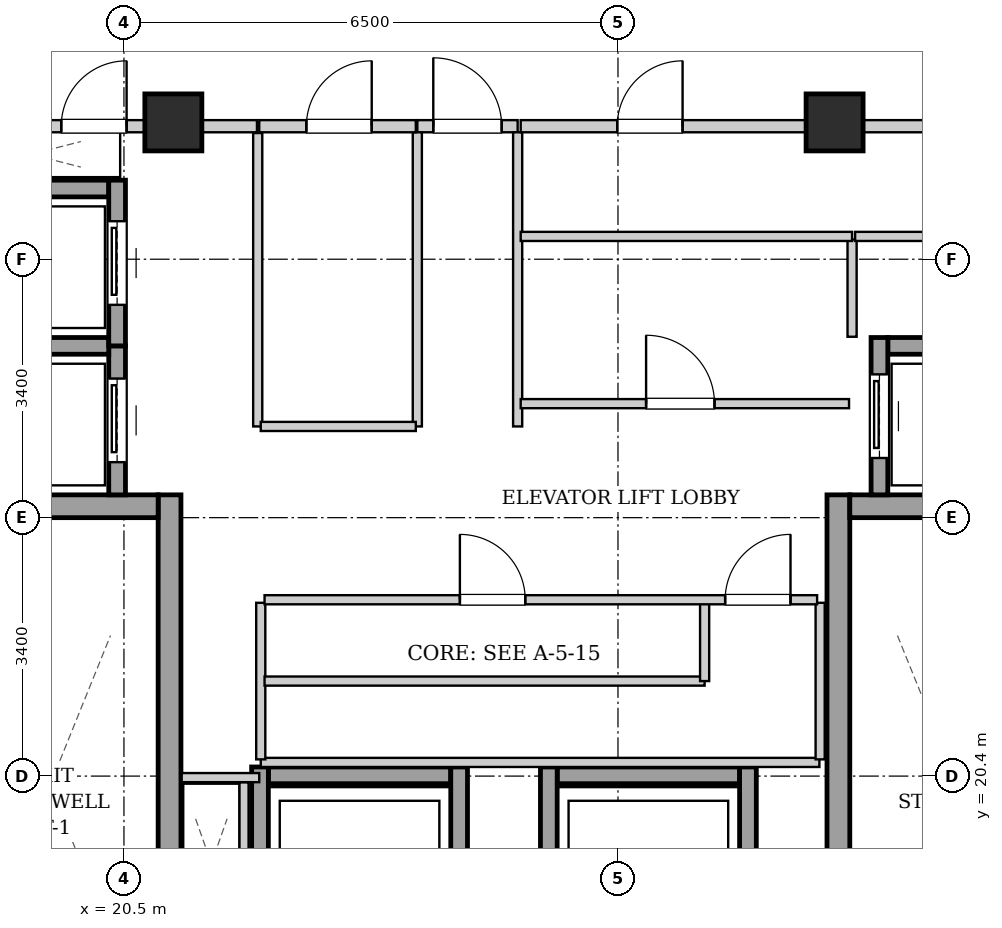
"""IFC4 building model, lengths in metres.
Left out: names, types, materials, properties, quantities, classifications, styles, units other than length and angle.
Written with IfcOpenShell. Run it as: python <this file> out.ifc"""

import sys

from ifc_helpers import new_model, si_unit, direction, frame, frame_2d, origin, origin_2d, place, context, subcontext, project, spatial, rectangle, extrude, element, fill, save


model = new_model("IFC4")
c1 = context("Model", 3, precision=1e-05, world=origin(), true_north=direction((0.0, 1.0)))
c2 = subcontext(c1, "Body", "Model", "MODEL_VIEW")
j1 = project(units=[si_unit("LENGTHUNIT", "METRE"), si_unit("PLANEANGLEUNIT", "RADIAN")], contexts=[c1])
p1 = place(None, origin())
s1 = spatial("IfcSite", under=j1, at=p1, CompositionType="ELEMENT")
p2 = place(p1, origin())
s2 = spatial("IfcBuilding", under=s1, at=p2, CompositionType="ELEMENT")
p3 = place(p2, frame((0.0, 0.0, 217.3)))
s3 = spatial("IfcBuildingStorey", under=s2, at=p3, CompositionType="ELEMENT", Elevation=217.3)
for number, where, z_axis, x_axis in (
    (1, (21.15, 29.0, 0.0), (0.0, 0.0, 1.0), (1.0, 0.0, 0.0)),
    (2, (29.85, 29.0, 0.0), (0.0, 0.0, 1.0), (1.0, 0.0, 0.0)),
):
    element("IfcColumn", number, at=place(p3, frame(where, z_axis=z_axis, x_axis=x_axis)), inside=s3, PredefinedType="COLUMN", context=c2, shape_type="SweptSolid", body=[
        extrude(rectangle(XDim=0.75, YDim=0.75, at=origin_2d()), origin(), (0.0, 0.0, 1.0), 3.4),
    ])
p4 = place(p3, frame((21.1, 15.1, 0.0), z_axis=(0.0, 0.0, 1.0), x_axis=(0.0, 1.0, 0.0)))
e3 = element("IfcWall", 3, at=p4, inside=s3, PredefinedType="SHEAR", context=c2, shape_type="SweptSolid", body=[
    extrude(rectangle(XDim=9.0, YDim=0.3, at=frame_2d((4.5, 0.0))), origin(), (0.0, 0.0, 1.0), 3.14),
])
p5 = place(p3, frame((18.1, 23.95, 0.0), z_axis=(0.0, 0.0, 1.0), x_axis=(1.0, 0.0, 0.0)))
e4 = element("IfcWall", 4, at=p5, inside=s3, PredefinedType="SHEAR", context=c2, shape_type="SweptSolid", body=[
    extrude(rectangle(XDim=2.85, YDim=0.3, at=frame_2d((1.425, 0.0))), origin(), (0.0, 0.0, 1.0), 3.14),
])
p6 = place(p3, frame((29.9, 15.1, 0.0), z_axis=(0.0, 0.0, 1.0), x_axis=(0.0, 1.0, 0.0)))
e5 = element("IfcWall", 5, at=p6, inside=s3, PredefinedType="SHEAR", context=c2, shape_type="SweptSolid", body=[
    extrude(rectangle(XDim=9.0, YDim=0.3, at=frame_2d((4.5, 0.0))), origin(), (0.0, 0.0, 1.0), 3.14),
])
p7 = place(p3, frame((30.05, 23.95, 0.0), z_axis=(0.0, 0.0, 1.0), x_axis=(1.0, 0.0, 0.0)))
e6 = element("IfcWall", 6, at=p7, inside=s3, PredefinedType="SHEAR", context=c2, shape_type="SweptSolid", body=[
    extrude(rectangle(XDim=2.85, YDim=0.3, at=frame_2d((1.425, 0.0))), origin(), (0.0, 0.0, 1.0), 3.14),
])
p8 = place(p3, frame((20.41, 24.1, 0.0), z_axis=(0.0, 0.0, 1.0), x_axis=(0.0, 1.0, 0.0)))
e7 = element("IfcWall", 7, at=p8, inside=s3, PredefinedType="SHEAR", context=c2, shape_type="SweptSolid", body=[
    extrude(rectangle(XDim=1.96, YDim=0.22, at=frame_2d((0.98, 0.0))), origin(), (0.0, 0.0, 1.0), 3.14),
])
p9 = place(p8, frame((0.43, 0.0, 0.0)))
e8 = element("IfcOpeningElement", 8, at=p9, cuts=e7, PredefinedType="OPENING", context=c2, shape_type="SweptSolid", body=[
    extrude(rectangle(XDim=1.1, YDim=2.15, at=frame_2d((0.55, 1.075))), frame((0.0, 0.12, 0.0), z_axis=(0.0, -1.0, 0.0), x_axis=(1.0, 0.0, 0.0)), (0.0, 0.0, 1.0), 0.24),
])
for number, where, z_axis, x_axis in (
    (9, (18.4, 26.06, 0.0), (0.0, 0.0, 1.0), (1.0, 0.0, 0.0)),
    (10, (18.4, 28.13, 0.0), (0.0, 0.0, 1.0), (1.0, 0.0, 0.0)),
):
    element("IfcWall", number, at=place(p3, frame(where, z_axis=z_axis, x_axis=x_axis)), inside=s3, PredefinedType="SHEAR", context=c2, shape_type="SweptSolid", body=[
        extrude(rectangle(XDim=1.9, YDim=0.22, at=frame_2d((0.95, 0.0))), origin(), (0.0, 0.0, 1.0), 3.14),
    ])
p10 = place(p3, frame((20.41, 26.06, 0.0), z_axis=(0.0, 0.0, 1.0), x_axis=(0.0, 1.0, 0.0)))
e11 = element("IfcWall", 11, at=p10, inside=s3, PredefinedType="SHEAR", context=c2, shape_type="SweptSolid", body=[
    extrude(rectangle(XDim=2.18, YDim=0.22, at=frame_2d((1.09, 0.0))), origin(), (0.0, 0.0, 1.0), 3.14),
])
p11 = place(p10, frame((0.54, 0.0, 0.0)))
e12 = element("IfcOpeningElement", 12, at=p11, cuts=e11, PredefinedType="OPENING", context=c2, shape_type="SweptSolid", body=[
    extrude(rectangle(XDim=1.1, YDim=2.15, at=frame_2d((0.55, 1.075))), frame((0.0, 0.12, 0.0), z_axis=(0.0, -1.0, 0.0), x_axis=(1.0, 0.0, 0.0)), (0.0, 0.0, 1.0), 0.24),
])
p12 = place(p3, frame((30.55, 26.06, 0.0), z_axis=(0.0, 0.0, 1.0), x_axis=(1.0, 0.0, 0.0)))
e13 = element("IfcWall", 13, at=p12, inside=s3, PredefinedType="SHEAR", context=c2, shape_type="SweptSolid", body=[
    extrude(rectangle(XDim=1.9, YDim=0.22, at=frame_2d((0.95, 0.0))), origin(), (0.0, 0.0, 1.0), 3.14),
])
p13 = place(p3, frame((30.44, 24.1, 0.0), z_axis=(0.0, 0.0, 1.0), x_axis=(0.0, 1.0, 0.0)))
e14 = element("IfcWall", 14, at=p13, inside=s3, PredefinedType="SHEAR", context=c2, shape_type="SweptSolid", body=[
    extrude(rectangle(XDim=2.07, YDim=0.22, at=frame_2d((1.035, 0.0))), origin(), (0.0, 0.0, 1.0), 3.14),
])
p14 = place(p13, frame((0.485, 0.0, 0.0)))
e15 = element("IfcOpeningElement", 15, at=p14, cuts=e14, PredefinedType="OPENING", context=c2, shape_type="SweptSolid", body=[
    extrude(rectangle(XDim=1.1, YDim=2.15, at=frame_2d((0.55, 1.075))), frame((0.0, 0.12, 0.0), z_axis=(0.0, -1.0, 0.0), x_axis=(1.0, 0.0, 0.0)), (0.0, 0.0, 1.0), 0.24),
])
p15 = place(p3, frame((22.4, 20.41, 0.0), z_axis=(0.0, 0.0, 1.0), x_axis=(1.0, 0.0, 0.0)))
e16 = element("IfcWall", 16, at=p15, inside=s3, PredefinedType="SHEAR", context=c2, shape_type="SweptSolid", body=[
    extrude(rectangle(XDim=2.4, YDim=0.22, at=frame_2d((1.2, 0.0))), origin(), (0.0, 0.0, 1.0), 3.14),
])
for number, where, z_axis, x_axis in (
    (17, (22.29, 17.98, 0.0), (0.0, 0.0, 1.0), (0.0, 1.0, 0.0)),
    (18, (24.91, 17.98, 0.0), (0.0, 0.0, 1.0), (0.0, 1.0, 0.0)),
):
    element("IfcWall", number, at=place(p3, frame(where, z_axis=z_axis, x_axis=x_axis)), inside=s3, PredefinedType="SHEAR", context=c2, shape_type="SweptSolid", body=[
        extrude(rectangle(XDim=2.54, YDim=0.22, at=frame_2d((1.27, 0.0))), origin(), (0.0, 0.0, 1.0), 3.14),
    ])
p16 = place(p3, frame((26.2, 20.41, 0.0), z_axis=(0.0, 0.0, 1.0), x_axis=(1.0, 0.0, 0.0)))
e19 = element("IfcWall", 19, at=p16, inside=s3, PredefinedType="SHEAR", context=c2, shape_type="SweptSolid", body=[
    extrude(rectangle(XDim=2.4, YDim=0.22, at=frame_2d((1.2, 0.0))), origin(), (0.0, 0.0, 1.0), 3.14),
])
for number, where, z_axis, x_axis in (
    (20, (26.09, 17.98, 0.0), (0.0, 0.0, 1.0), (0.0, 1.0, 0.0)),
    (21, (28.71, 17.98, 0.0), (0.0, 0.0, 1.0), (0.0, 1.0, 0.0)),
):
    element("IfcWall", number, at=place(p3, frame(where, z_axis=z_axis, x_axis=x_axis)), inside=s3, PredefinedType="SHEAR", context=c2, shape_type="SweptSolid", body=[
        extrude(rectangle(XDim=2.54, YDim=0.22, at=frame_2d((1.27, 0.0))), origin(), (0.0, 0.0, 1.0), 3.14),
    ])
p17 = place(p3, frame((24.36, 28.95, 0.0), z_axis=(0.0, 0.0, 1.0), x_axis=(1.0, 0.0, 0.0)))
e22 = element("IfcWall", 22, at=p17, inside=s3, PredefinedType="PARTITIONING", context=c2, shape_type="SweptSolid", body=[
    extrude(rectangle(XDim=1.32, YDim=0.16, at=frame_2d((0.66, 0.0))), origin(), (0.0, 0.0, 1.0), 2.668),
])
p18 = place(p17, frame((0.21, 0.0, 0.0)))
e23 = element("IfcOpeningElement", 23, at=p18, cuts=e22, PredefinedType="OPENING", context=c2, shape_type="SweptSolid", body=[
    extrude(rectangle(XDim=0.9, YDim=2.05, at=frame_2d((0.45, 1.025))), frame((0.0, 0.09, 0.0), z_axis=(0.0, -1.0, 0.0), x_axis=(1.0, 0.0, 0.0)), (0.0, 0.0, 1.0), 0.18),
])
p19 = place(p3, frame((17.96, 28.95, 0.0), z_axis=(0.0, 0.0, 1.0), x_axis=(1.0, 0.0, 0.0)))
e24 = element("IfcWall", 24, at=p19, inside=s3, PredefinedType="PARTITIONING", context=c2, shape_type="SweptSolid", body=[
    extrude(rectangle(XDim=4.29, YDim=0.16, at=frame_2d((2.145, 0.0))), origin(), (0.0, 0.0, 1.0), 2.668),
])
p20 = place(p19, frame((1.715, 0.0, 0.0)))
e25 = element("IfcOpeningElement", 25, at=p20, cuts=e24, PredefinedType="OPENING", context=c2, shape_type="SweptSolid", body=[
    extrude(rectangle(XDim=0.86, YDim=2.05, at=frame_2d((0.43, 1.025))), frame((0.0, 0.09, 0.0), z_axis=(0.0, -1.0, 0.0), x_axis=(1.0, 0.0, 0.0)), (0.0, 0.0, 1.0), 0.18),
])
p21 = place(p3, frame((22.08, 18.2, 0.0), z_axis=(0.0, 0.0, 1.0), x_axis=(0.0, 1.0, 0.0)))
e26 = element("IfcWall", 26, at=p21, inside=s3, PredefinedType="PARTITIONING", context=c2, shape_type="SweptSolid", body=[
    extrude(rectangle(XDim=2.12, YDim=0.12, at=frame_2d((1.06, 0.0))), origin(), (0.0, 0.0, 1.0), 3.14),
])
p22 = place(p3, frame((22.28, 20.38, 0.0), z_axis=(0.0, 0.0, 1.0), x_axis=(-1.0, 0.0, 0.0)))
e27 = element("IfcWall", 27, at=p22, inside=s3, PredefinedType="PARTITIONING", context=c2, shape_type="SweptSolid", body=[
    extrude(rectangle(XDim=1.02, YDim=0.12, at=frame_2d((0.51, 0.0))), origin(), (0.0, 0.0, 1.0), 3.14),
])
for number, where, z_axis, x_axis in (
    (28, (24.36, 25.0, 0.0), (0.0, 0.0, 1.0), (0.0, 1.0, 0.0)),
    (29, (25.68, 25.0, 0.0), (0.0, 0.0, 1.0), (0.0, 1.0, 0.0)),
):
    element("IfcWall", number, at=place(p3, frame(where, z_axis=z_axis, x_axis=x_axis)), inside=s3, PredefinedType="PARTITIONING", context=c2, shape_type="SweptSolid", body=[
        extrude(rectangle(XDim=3.87, YDim=0.12, at=frame_2d((1.935, 0.0))), origin(), (0.0, 0.0, 1.0), 3.14),
    ])
p23 = place(p3, frame((30.08, 26.18, 0.0), z_axis=(0.0, 0.0, 1.0), x_axis=(0.0, 1.0, 0.0)))
e30 = element("IfcWall", 30, at=p23, inside=s3, PredefinedType="PARTITIONING", context=c2, shape_type="SweptSolid", body=[
    extrude(rectangle(XDim=1.28, YDim=0.12, at=frame_2d((0.64, 0.0))), origin(), (0.0, 0.0, 1.0), 3.14),
])
p24 = place(p3, frame((30.12, 27.5, 0.0), z_axis=(0.0, 0.0, 1.0), x_axis=(1.0, 0.0, 0.0)))
e31 = element("IfcWall", 31, at=p24, inside=s3, PredefinedType="PARTITIONING", context=c2, shape_type="SweptSolid", body=[
    extrude(rectangle(XDim=2.92, YDim=0.12, at=frame_2d((1.46, 0.0))), origin(), (0.0, 0.0, 1.0), 3.14),
])
p25 = place(p24, frame((0.97, 0.0, 0.0)))
e32 = element("IfcOpeningElement", 32, at=p25, cuts=e31, PredefinedType="OPENING", context=c2, shape_type="SweptSolid", body=[
    extrude(rectangle(XDim=0.86, YDim=2.05, at=frame_2d((0.43, 1.025))), frame((0.0, 0.07, 0.0), z_axis=(0.0, -1.0, 0.0), x_axis=(1.0, 0.0, 0.0)), (0.0, 0.0, 1.0), 0.14),
])
p26 = place(p3, frame((22.26, 25.0, 0.0), z_axis=(0.0, 0.0, 1.0), x_axis=(0.0, 1.0, 0.0)))
e33 = element("IfcWall", 33, at=p26, inside=s3, PredefinedType="PARTITIONING", context=c2, shape_type="SweptSolid", body=[
    extrude(rectangle(XDim=3.86, YDim=0.12, at=frame_2d((1.93, 0.0))), origin(), (0.0, 0.0, 1.0), 3.14),
])
p27 = place(p3, frame((22.3, 25.0, 0.0), z_axis=(0.0, 0.0, 1.0), x_axis=(1.0, 0.0, 0.0)))
e34 = element("IfcWall", 34, at=p27, inside=s3, PredefinedType="PARTITIONING", context=c2, shape_type="SweptSolid", body=[
    extrude(rectangle(XDim=2.04, YDim=0.12, at=frame_2d((1.02, 0.0))), origin(), (0.0, 0.0, 1.0), 3.14),
])
p28 = place(p3, frame((22.28, 28.95, 0.0), z_axis=(0.0, 0.0, 1.0), x_axis=(1.0, 0.0, 0.0)))
e35 = element("IfcWall", 35, at=p28, inside=s3, PredefinedType="PARTITIONING", context=c2, shape_type="SweptSolid", body=[
    extrude(rectangle(XDim=2.06, YDim=0.16, at=frame_2d((1.03, 0.0))), origin(), (0.0, 0.0, 1.0), 2.668),
])
p29 = place(p28, frame((0.62, 0.0, 0.0)))
e36 = element("IfcOpeningElement", 36, at=p29, cuts=e35, PredefinedType="OPENING", context=c2, shape_type="SweptSolid", body=[
    extrude(rectangle(XDim=0.86, YDim=2.05, at=frame_2d((0.43, 1.025))), frame((0.0, 0.09, 0.0), z_axis=(0.0, -1.0, 0.0), x_axis=(1.0, 0.0, 0.0)), (0.0, 0.0, 1.0), 0.18),
])
p30 = place(p3, frame((25.72, 27.5, 0.0), z_axis=(0.0, 0.0, 1.0), x_axis=(1.0, 0.0, 0.0)))
e37 = element("IfcWall", 37, at=p30, inside=s3, PredefinedType="PARTITIONING", context=c2, shape_type="SweptSolid", body=[
    extrude(rectangle(XDim=4.36, YDim=0.12, at=frame_2d((2.18, 0.0))), origin(), (0.0, 0.0, 1.0), 3.14),
])
p31 = place(p3, frame((25.72, 25.3, 0.0), z_axis=(0.0, 0.0, 1.0), x_axis=(1.0, 0.0, 0.0)))
e38 = element("IfcWall", 38, at=p31, inside=s3, PredefinedType="PARTITIONING", context=c2, shape_type="SweptSolid", body=[
    extrude(rectangle(XDim=4.32, YDim=0.12, at=frame_2d((2.16, 0.0))), origin(), (0.0, 0.0, 1.0), 3.14),
])
p32 = place(p31, frame((1.65, 0.0, 0.0)))
e39 = element("IfcOpeningElement", 39, at=p32, cuts=e38, PredefinedType="OPENING", context=c2, shape_type="SweptSolid", body=[
    extrude(rectangle(XDim=0.9, YDim=2.05, at=frame_2d((0.45, 1.025))), frame((0.0, 0.07, 0.0), z_axis=(0.0, -1.0, 0.0), x_axis=(1.0, 0.0, 0.0)), (0.0, 0.0, 1.0), 0.14),
])
p33 = place(p3, frame((25.72, 28.95, 0.0), z_axis=(0.0, 0.0, 1.0), x_axis=(1.0, 0.0, 0.0)))
e40 = element("IfcWall", 40, at=p33, inside=s3, PredefinedType="PARTITIONING", context=c2, shape_type="SweptSolid", body=[
    extrude(rectangle(XDim=7.32, YDim=0.16, at=frame_2d((3.66, 0.0))), origin(), (0.0, 0.0, 1.0), 2.668),
])
p34 = place(p33, frame((1.27, 0.0, 0.0)))
e41 = element("IfcOpeningElement", 41, at=p34, cuts=e40, PredefinedType="OPENING", context=c2, shape_type="SweptSolid", body=[
    extrude(rectangle(XDim=0.86, YDim=2.05, at=frame_2d((0.43, 1.025))), frame((0.0, 0.09, 0.0), z_axis=(0.0, -1.0, 0.0), x_axis=(1.0, 0.0, 0.0)), (0.0, 0.0, 1.0), 0.18),
])
p35 = place(p3, frame((22.3, 20.58, 0.0), z_axis=(0.0, 0.0, 1.0), x_axis=(1.0, 0.0, 0.0)))
e42 = element("IfcWall", 42, at=p35, inside=s3, PredefinedType="PARTITIONING", context=c2, shape_type="SweptSolid", body=[
    extrude(rectangle(XDim=7.35, YDim=0.12, at=frame_2d((3.675, 0.0))), origin(), (0.0, 0.0, 1.0), 3.14),
])
for number, where, z_axis, x_axis in (
    (43, (22.3, 20.62, 0.0), (0.0, 0.0, 1.0), (0.0, 1.0, 0.0)),
    (44, (29.66, 20.62, 0.0), (0.0, 0.0, 1.0), (0.0, 1.0, 0.0)),
):
    element("IfcWall", number, at=place(p3, frame(where, z_axis=z_axis, x_axis=x_axis)), inside=s3, PredefinedType="PARTITIONING", context=c2, shape_type="SweptSolid", body=[
        extrude(rectangle(XDim=2.06, YDim=0.12, at=frame_2d((1.03, 0.0))), origin(), (0.0, 0.0, 1.0), 3.14),
    ])
p36 = place(p3, frame((22.35, 21.65, 0.0), z_axis=(0.0, 0.0, 1.0), x_axis=(1.0, 0.0, 0.0)))
e45 = element("IfcWall", 45, at=p36, inside=s3, PredefinedType="PARTITIONING", context=c2, shape_type="SweptSolid", body=[
    extrude(rectangle(XDim=5.79, YDim=0.12, at=frame_2d((2.895, 0.0))), origin(), (0.0, 0.0, 1.0), 3.14),
])
p37 = place(p3, frame((28.14, 21.65, 0.0), z_axis=(0.0, 0.0, 1.0), x_axis=(0.0, 1.0, 0.0)))
e46 = element("IfcWall", 46, at=p37, inside=s3, PredefinedType="PARTITIONING", context=c2, shape_type="SweptSolid", body=[
    extrude(rectangle(XDim=1.03, YDim=0.12, at=frame_2d((0.515, 0.0))), origin(), (0.0, 0.0, 1.0), 3.14),
])
p38 = place(p3, frame((22.35, 22.72, 0.0), z_axis=(0.0, 0.0, 1.0), x_axis=(1.0, 0.0, 0.0)))
e47 = element("IfcWall", 47, at=p38, inside=s3, PredefinedType="PARTITIONING", context=c2, shape_type="SweptSolid", body=[
    extrude(rectangle(XDim=7.27, YDim=0.12, at=frame_2d((3.635, 0.0))), origin(), (0.0, 0.0, 1.0), 3.14),
])
p39 = place(p38, frame((2.57, 0.0, 0.0)))
e48 = element("IfcOpeningElement", 48, at=p39, cuts=e47, PredefinedType="OPENING", context=c2, shape_type="SweptSolid", body=[
    extrude(rectangle(XDim=0.86, YDim=2.05, at=frame_2d((0.43, 1.025))), frame((0.0, 0.07, 0.0), z_axis=(0.0, -1.0, 0.0), x_axis=(1.0, 0.0, 0.0)), (0.0, 0.0, 1.0), 0.14),
])
p40 = place(p38, frame((6.06, 0.0, 0.0)))
e49 = element("IfcOpeningElement", 49, at=p40, cuts=e47, PredefinedType="OPENING", context=c2, shape_type="SweptSolid", body=[
    extrude(rectangle(XDim=0.86, YDim=2.05, at=frame_2d((0.43, 1.025))), frame((0.0, 0.07, 0.0), z_axis=(0.0, -1.0, 0.0), x_axis=(1.0, 0.0, 0.0)), (0.0, 0.0, 1.0), 0.14),
])
p41 = place(p9, origin())
e50 = element("IfcDoor", 50, at=p41, inside=s3, OperationType="SLIDING_TO_LEFT", PredefinedType="DOOR", context=c2, shape_type="SweptSolid", body=[
    extrude(rectangle(XDim=1.1, YDim=2.15, at=frame_2d((0.55, 1.075))), frame((0.0, 0.025, 0.0), z_axis=(0.0, -1.0, 0.0), x_axis=(1.0, 0.0, 0.0)), (0.0, 0.0, 1.0), 0.05),
])
fill(e8, e50)
p42 = place(p11, origin())
e51 = element("IfcDoor", 51, at=p42, inside=s3, OperationType="SLIDING_TO_LEFT", PredefinedType="DOOR", context=c2, shape_type="SweptSolid", body=[
    extrude(rectangle(XDim=1.1, YDim=2.15, at=frame_2d((0.55, 1.075))), frame((0.0, 0.025, 0.0), z_axis=(0.0, -1.0, 0.0), x_axis=(1.0, 0.0, 0.0)), (0.0, 0.0, 1.0), 0.05),
])
fill(e12, e51)
p43 = place(p14, origin())
e52 = element("IfcDoor", 52, at=p43, inside=s3, OperationType="SLIDING_TO_LEFT", PredefinedType="DOOR", context=c2, shape_type="SweptSolid", body=[
    extrude(rectangle(XDim=1.1, YDim=2.15, at=frame_2d((0.55, 1.075))), frame((0.0, 0.025, 0.0), z_axis=(0.0, -1.0, 0.0), x_axis=(1.0, 0.0, 0.0)), (0.0, 0.0, 1.0), 0.05),
])
fill(e15, e52)
p44 = place(p18, origin())
e53 = element("IfcDoor", 53, at=p44, inside=s3, OperationType="SINGLE_SWING_LEFT", PredefinedType="DOOR", context=c2, shape_type="SweptSolid", body=[
    extrude(rectangle(XDim=0.9, YDim=2.05, at=frame_2d((0.45, 1.025))), frame((0.0, 0.025, 0.0), z_axis=(0.0, -1.0, 0.0), x_axis=(1.0, 0.0, 0.0)), (0.0, 0.0, 1.0), 0.05),
])
fill(e23, e53)
p45 = place(p20, origin())
e54 = element("IfcDoor", 54, at=p45, inside=s3, OperationType="SINGLE_SWING_RIGHT", PredefinedType="DOOR", context=c2, shape_type="SweptSolid", body=[
    extrude(rectangle(XDim=0.86, YDim=2.05, at=frame_2d((0.43, 1.025))), frame((0.0, 0.025, 0.0), z_axis=(0.0, -1.0, 0.0), x_axis=(1.0, 0.0, 0.0)), (0.0, 0.0, 1.0), 0.05),
])
fill(e25, e54)
p46 = place(p29, origin())
e55 = element("IfcDoor", 55, at=p46, inside=s3, OperationType="SINGLE_SWING_RIGHT", PredefinedType="DOOR", context=c2, shape_type="SweptSolid", body=[
    extrude(rectangle(XDim=0.86, YDim=2.05, at=frame_2d((0.43, 1.025))), frame((0.0, 0.025, 0.0), z_axis=(0.0, -1.0, 0.0), x_axis=(1.0, 0.0, 0.0)), (0.0, 0.0, 1.0), 0.05),
])
fill(e36, e55)
p47 = place(p32, origin())
e56 = element("IfcDoor", 56, at=p47, inside=s3, OperationType="SINGLE_SWING_LEFT", PredefinedType="DOOR", context=c2, shape_type="SweptSolid", body=[
    extrude(rectangle(XDim=0.9, YDim=2.05, at=frame_2d((0.45, 1.025))), frame((0.0, 0.025, 0.0), z_axis=(0.0, -1.0, 0.0), x_axis=(1.0, 0.0, 0.0)), (0.0, 0.0, 1.0), 0.05),
])
fill(e39, e56)
p48 = place(p34, origin())
e57 = element("IfcDoor", 57, at=p48, inside=s3, OperationType="SINGLE_SWING_RIGHT", PredefinedType="DOOR", context=c2, shape_type="SweptSolid", body=[
    extrude(rectangle(XDim=0.86, YDim=2.05, at=frame_2d((0.43, 1.025))), frame((0.0, 0.025, 0.0), z_axis=(0.0, -1.0, 0.0), x_axis=(1.0, 0.0, 0.0)), (0.0, 0.0, 1.0), 0.05),
])
fill(e41, e57)
p49 = place(p39, origin())
e58 = element("IfcDoor", 58, at=p49, inside=s3, OperationType="SINGLE_SWING_LEFT", PredefinedType="DOOR", context=c2, shape_type="SweptSolid", body=[
    extrude(rectangle(XDim=0.86, YDim=2.05, at=frame_2d((0.43, 1.025))), frame((0.0, 0.025, 0.0), z_axis=(0.0, -1.0, 0.0), x_axis=(1.0, 0.0, 0.0)), (0.0, 0.0, 1.0), 0.05),
])
fill(e48, e58)
p50 = place(p40, origin())
e59 = element("IfcDoor", 59, at=p50, inside=s3, OperationType="SINGLE_SWING_RIGHT", PredefinedType="DOOR", context=c2, shape_type="SweptSolid", body=[
    extrude(rectangle(XDim=0.86, YDim=2.05, at=frame_2d((0.43, 1.025))), frame((0.0, 0.025, 0.0), z_axis=(0.0, -1.0, 0.0), x_axis=(1.0, 0.0, 0.0)), (0.0, 0.0, 1.0), 0.05),
])
fill(e49, e59)
save(model, sys.argv[1])
